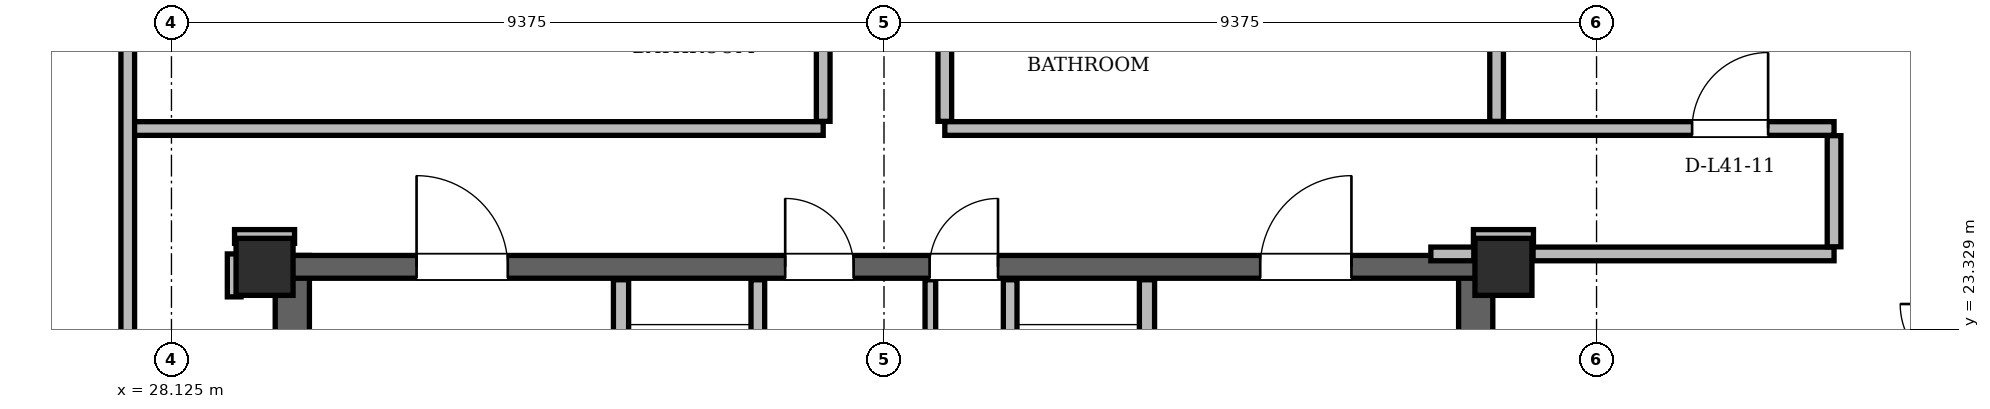
"""IFC4 building model, lengths in metres.
Left out: names, types, materials, properties, quantities, classifications, styles, units other than length and angle.
Written with IfcOpenShell. Run it as: python <this file> out.ifc"""

import sys

from ifc_helpers import new_model, si_unit, direction, frame, frame_2d, origin, origin_2d, place, context, subcontext, project, spatial, rectangle, hollow_rectangle, extrude, element, fill, save


model = new_model("IFC4")
c1 = context("Model", 3, precision=1e-05, world=origin(), true_north=direction((0.0, 1.0)))
c2 = subcontext(c1, "Body", "Model", "MODEL_VIEW")
j1 = project(units=[si_unit("LENGTHUNIT", "METRE"), si_unit("PLANEANGLEUNIT", "RADIAN")], contexts=[c1])
p1 = place(None, origin())
s1 = spatial("IfcSite", under=j1, at=p1, CompositionType="ELEMENT")
p2 = place(p1, origin())
s2 = spatial("IfcBuilding", under=s1, at=p2, CompositionType="ELEMENT")
p3 = place(p2, frame((0.0, 0.0, 156.6)))
s3 = spatial("IfcBuildingStorey", under=s2, at=p3, CompositionType="ELEMENT", Elevation=156.6)
for number, where, z_axis, x_axis in (
    (1, (45.65, 24.15, 0.0), (0.0, 0.0, 1.0), (1.0, 0.0, 0.0)),
    (2, (29.35, 24.15, 0.0), (0.0, 0.0, 1.0), (1.0, 0.0, 0.0)),
):
    element("IfcColumn", number, at=place(p3, frame(where, z_axis=z_axis, x_axis=x_axis)), inside=s3, PredefinedType="COLUMN", context=c2, shape_type="SweptSolid", body=[
        extrude(hollow_rectangle(XDim=0.75, YDim=0.75, WallThickness=0.06, at=origin_2d()), origin(), (0.0, 0.0, 1.0), 3.6),
    ])
for number, where, z_axis, x_axis in (
    (3, (29.715, 11.0, 0.0), (0.0, 0.0, 1.0), (0.0, 1.0, 0.0)),
    (4, (45.285, 11.0, 0.0), (0.0, 0.0, 1.0), (0.0, 1.0, 0.0)),
):
    element("IfcWall", number, at=place(p3, frame(where, z_axis=z_axis, x_axis=x_axis)), inside=s3, PredefinedType="SHEAR", context=c2, shape_type="SweptSolid", body=[
        extrude(rectangle(XDim=13.3, YDim=0.45, at=frame_2d((6.65, 0.0))), origin(), (0.0, 0.0, 1.0), 3.38),
    ])
p4 = place(p3, frame((29.65, 24.15, 0.0), z_axis=(0.0, 0.0, 1.0), x_axis=(1.0, 0.0, 0.0)))
e5 = element("IfcWall", 5, at=p4, inside=s3, PredefinedType="SHEAR", context=c2, shape_type="SweptSolid", body=[
    extrude(rectangle(XDim=15.7, YDim=0.3, at=frame_2d((7.85, 0.0))), origin(), (0.0, 0.0, 1.0), 3.38),
])
p5 = place(p4, frame((1.7, 0.0, 0.0)))
e6 = element("IfcOpeningElement", 6, at=p5, cuts=e5, PredefinedType="OPENING", context=c2, shape_type="SweptSolid", body=[
    extrude(rectangle(XDim=1.2, YDim=2.2, at=frame_2d((0.6, 1.1))), frame((0.0, 0.15, 0.0), z_axis=(0.0, -1.0, 0.0), x_axis=(1.0, 0.0, 0.0)), (0.0, 0.0, 1.0), 0.3),
])
p6 = place(p4, frame((12.8, 0.0, 0.0)))
e7 = element("IfcOpeningElement", 7, at=p6, cuts=e5, PredefinedType="OPENING", context=c2, shape_type="SweptSolid", body=[
    extrude(rectangle(XDim=1.2, YDim=2.2, at=frame_2d((0.6, 1.1))), frame((0.0, 0.15, 0.0), z_axis=(0.0, -1.0, 0.0), x_axis=(1.0, 0.0, 0.0)), (0.0, 0.0, 1.0), 0.3),
])
p7 = place(p4, frame((6.55, 0.0, 0.0)))
e8 = element("IfcOpeningElement", 8, at=p7, cuts=e5, PredefinedType="OPENING", context=c2, shape_type="SweptSolid", body=[
    extrude(rectangle(XDim=0.9, YDim=2.05, at=frame_2d((0.45, 1.025))), frame((0.0, 0.15, 0.0), z_axis=(0.0, -1.0, 0.0), x_axis=(1.0, 0.0, 0.0)), (0.0, 0.0, 1.0), 0.3),
])
p8 = place(p4, frame((8.45, 0.0, 0.0)))
e9 = element("IfcOpeningElement", 9, at=p8, cuts=e5, PredefinedType="OPENING", context=c2, shape_type="SweptSolid", body=[
    extrude(rectangle(XDim=0.9, YDim=2.05, at=frame_2d((0.45, 1.025))), frame((0.0, 0.15, 0.0), z_axis=(0.0, -1.0, 0.0), x_axis=(1.0, 0.0, 0.0)), (0.0, 0.0, 1.0), 0.3),
])
p9 = place(p3, frame((59.902, 12.477, 0.0), z_axis=(0.0, 0.0, 1.0), x_axis=(-0.499998839087, 0.866026074037, 0.0)))
e10 = element("IfcWall", 10, at=p9, inside=s3, PredefinedType="SOLIDWALL", context=c2, shape_type="SweptSolid", body=[
    extrude(rectangle(XDim=35.606, YDim=0.34, at=frame_2d((17.803, 0.0))), origin(), (0.0, 0.0, 1.0), 2.6),
])
p10 = place(p9, frame((7.615, 0.0, 0.0)))
e11 = element("IfcOpeningElement", 11, at=p10, cuts=e10, PredefinedType="OPENING", context=c2, shape_type="SweptSolid", body=[
    extrude(rectangle(XDim=1.5, YDim=2.2, at=frame_2d((0.75, 1.1))), frame((0.0, 0.17, 0.0), z_axis=(0.0, -1.0, 0.0), x_axis=(1.0, 0.0, 0.0)), (0.0, 0.0, 1.0), 0.34),
])
p11 = place(p9, frame((30.887, 0.0, 0.0)))
e12 = element("IfcOpeningElement", 12, at=p11, cuts=e10, PredefinedType="OPENING", context=c2, shape_type="SweptSolid", body=[
    extrude(rectangle(XDim=1.5, YDim=2.2, at=frame_2d((0.75, 1.1))), frame((0.0, 0.17, 0.0), z_axis=(0.0, -1.0, 0.0), x_axis=(1.0, 0.0, 0.0)), (0.0, 0.0, 1.0), 0.34),
])
p12 = place(p9, frame((0.903, 0.0, 0.85)))
e13 = element("IfcOpeningElement", 13, at=p12, cuts=e10, PredefinedType="OPENING", context=c2, shape_type="SweptSolid", body=[
    extrude(rectangle(XDim=1.2, YDim=1.48, at=frame_2d((0.6, 0.74))), frame((0.0, 0.17, 0.0), z_axis=(0.0, -1.0, 0.0), x_axis=(1.0, 0.0, 0.0)), (0.0, 0.0, 1.0), 0.34),
])
p13 = place(p9, frame((17.144, 0.0, 0.85)))
e14 = element("IfcOpeningElement", 14, at=p13, cuts=e10, PredefinedType="OPENING", context=c2, shape_type="SweptSolid", body=[
    extrude(rectangle(XDim=2.6, YDim=1.64, at=frame_2d((1.3, 0.82))), frame((0.0, 0.17, 0.0), z_axis=(0.0, -1.0, 0.0), x_axis=(1.0, 0.0, 0.0)), (0.0, 0.0, 1.0), 0.34),
])
p14 = place(p9, frame((22.144, 0.0, 0.85)))
e15 = element("IfcOpeningElement", 15, at=p14, cuts=e10, PredefinedType="OPENING", context=c2, shape_type="SweptSolid", body=[
    extrude(rectangle(XDim=2.0, YDim=1.64, at=frame_2d((1.0, 0.82))), frame((0.0, 0.17, 0.0), z_axis=(0.0, -1.0, 0.0), x_axis=(1.0, 0.0, 0.0)), (0.0, 0.0, 1.0), 0.34),
])
p15 = place(p9, frame((13.335, 0.0, 0.85)))
e16 = element("IfcOpeningElement", 16, at=p15, cuts=e10, PredefinedType="OPENING", context=c2, shape_type="SweptSolid", body=[
    extrude(rectangle(XDim=1.6, YDim=1.64, at=frame_2d((0.8, 0.82))), frame((0.0, 0.17, 0.0), z_axis=(0.0, -1.0, 0.0), x_axis=(1.0, 0.0, 0.0)), (0.0, 0.0, 1.0), 0.34),
])
p16 = place(p9, frame((25.813, 0.0, 0.85)))
e17 = element("IfcOpeningElement", 17, at=p16, cuts=e10, PredefinedType="OPENING", context=c2, shape_type="SweptSolid", body=[
    extrude(rectangle(XDim=1.6, YDim=1.64, at=frame_2d((0.8, 0.82))), frame((0.0, 0.17, 0.0), z_axis=(0.0, -1.0, 0.0), x_axis=(1.0, 0.0, 0.0)), (0.0, 0.0, 1.0), 0.34),
])
p17 = place(p9, frame((33.272, 0.0, 0.85)))
e18 = element("IfcOpeningElement", 18, at=p17, cuts=e10, PredefinedType="OPENING", context=c2, shape_type="SweptSolid", body=[
    extrude(rectangle(XDim=1.2, YDim=1.48, at=frame_2d((0.6, 0.74))), frame((0.0, 0.17, 0.0), z_axis=(0.0, -1.0, 0.0), x_axis=(1.0, 0.0, 0.0)), (0.0, 0.0, 1.0), 0.34),
])
p18 = place(p3, frame((32.901, 43.313, 0.0), z_axis=(0.0, 0.0, 1.0), x_axis=(-0.499998839087, -0.866026074037, 0.0)))
e19 = element("IfcWall", 19, at=p18, inside=s3, PredefinedType="SOLIDWALL", context=c2, shape_type="SweptSolid", body=[
    extrude(rectangle(XDim=35.606, YDim=0.34, at=frame_2d((17.803, 0.0))), origin(), (0.0, 0.0, 1.0), 2.6),
])
p19 = place(p18, frame((8.034, 0.0, 0.0)))
e20 = element("IfcOpeningElement", 20, at=p19, cuts=e19, PredefinedType="OPENING", context=c2, shape_type="SweptSolid", body=[
    extrude(rectangle(XDim=1.5, YDim=2.2, at=frame_2d((0.75, 1.1))), frame((0.0, 0.17, 0.0), z_axis=(0.0, -1.0, 0.0), x_axis=(1.0, 0.0, 0.0)), (0.0, 0.0, 1.0), 0.34),
])
p20 = place(p18, frame((30.887, 0.0, 0.0)))
e21 = element("IfcOpeningElement", 21, at=p20, cuts=e19, PredefinedType="OPENING", context=c2, shape_type="SweptSolid", body=[
    extrude(rectangle(XDim=1.5, YDim=2.2, at=frame_2d((0.75, 1.1))), frame((0.0, 0.17, 0.0), z_axis=(0.0, -1.0, 0.0), x_axis=(1.0, 0.0, 0.0)), (0.0, 0.0, 1.0), 0.34),
])
p21 = place(p18, frame((33.096, 0.0, 0.85)))
e22 = element("IfcOpeningElement", 22, at=p21, cuts=e19, PredefinedType="OPENING", context=c2, shape_type="SweptSolid", body=[
    extrude(rectangle(XDim=1.2, YDim=1.48, at=frame_2d((0.6, 0.74))), frame((0.0, 0.17, 0.0), z_axis=(0.0, -1.0, 0.0), x_axis=(1.0, 0.0, 0.0)), (0.0, 0.0, 1.0), 0.34),
])
p22 = place(p18, frame((13.168, 0.0, 0.85)))
e23 = element("IfcOpeningElement", 23, at=p22, cuts=e19, PredefinedType="OPENING", context=c2, shape_type="SweptSolid", body=[
    extrude(rectangle(XDim=1.2, YDim=1.48, at=frame_2d((0.6, 0.74))), frame((0.0, 0.17, 0.0), z_axis=(0.0, -1.0, 0.0), x_axis=(1.0, 0.0, 0.0)), (0.0, 0.0, 1.0), 0.34),
])
p23 = place(p18, frame((20.876, 0.0, 0.85)))
e24 = element("IfcOpeningElement", 24, at=p23, cuts=e19, PredefinedType="OPENING", context=c2, shape_type="SweptSolid", body=[
    extrude(rectangle(XDim=2.8, YDim=1.64, at=frame_2d((1.4, 0.82))), frame((0.0, 0.17, 0.0), z_axis=(0.0, -1.0, 0.0), x_axis=(1.0, 0.0, 0.0)), (0.0, 0.0, 1.0), 0.34),
])
p24 = place(p18, frame((2.906, 0.0, 0.85)))
e25 = element("IfcOpeningElement", 25, at=p24, cuts=e19, PredefinedType="OPENING", context=c2, shape_type="SweptSolid", body=[
    extrude(rectangle(XDim=1.6, YDim=1.64, at=frame_2d((0.8, 0.82))), frame((0.0, 0.17, 0.0), z_axis=(0.0, -1.0, 0.0), x_axis=(1.0, 0.0, 0.0)), (0.0, 0.0, 1.0), 0.34),
])
p25 = place(p3, frame((34.04, 19.48, 0.0), z_axis=(0.0, 0.0, 1.0), x_axis=(0.0, 1.0, 0.0)))
e26 = element("IfcWall", 26, at=p25, inside=s3, PredefinedType="PARTITIONING", context=c2, shape_type="SweptSolid", body=[
    extrude(rectangle(XDim=4.5, YDim=0.2, at=frame_2d((2.25, 0.0))), origin(), (0.0, 0.0, 1.0), 2.42),
])
p26 = place(p25, frame((2.12, 0.0, 0.0)))
e27 = element("IfcOpeningElement", 27, at=p26, cuts=e26, PredefinedType="OPENING", context=c2, shape_type="SweptSolid", body=[
    extrude(rectangle(XDim=1.1, YDim=2.2, at=frame_2d((0.55, 1.1))), frame((0.0, 0.1, 0.0), z_axis=(0.0, -1.0, 0.0), x_axis=(1.0, 0.0, 0.0)), (0.0, 0.0, 1.0), 0.2),
])
p27 = place(p3, frame((35.84, 20.96, 0.0), z_axis=(0.0, 0.0, 1.0), x_axis=(0.0, 1.0, 0.0)))
e28 = element("IfcWall", 28, at=p27, inside=s3, PredefinedType="PARTITIONING", context=c2, shape_type="SweptSolid", body=[
    extrude(rectangle(XDim=3.02, YDim=0.18, at=frame_2d((1.51, 0.0))), origin(), (0.0, 0.0, 1.0), 2.42),
])
p28 = place(p3, frame((40.96, 19.48, 0.0), z_axis=(0.0, 0.0, 1.0), x_axis=(0.0, 1.0, 0.0)))
e29 = element("IfcWall", 29, at=p28, inside=s3, PredefinedType="PARTITIONING", context=c2, shape_type="SweptSolid", body=[
    extrude(rectangle(XDim=4.5, YDim=0.2, at=frame_2d((2.25, 0.0))), origin(), (0.0, 0.0, 1.0), 2.42),
])
p29 = place(p28, frame((2.12, 0.0, 0.0)))
e30 = element("IfcOpeningElement", 30, at=p29, cuts=e29, PredefinedType="OPENING", context=c2, shape_type="SweptSolid", body=[
    extrude(rectangle(XDim=1.1, YDim=2.2, at=frame_2d((0.55, 1.1))), frame((0.0, 0.1, 0.0), z_axis=(0.0, -1.0, 0.0), x_axis=(1.0, 0.0, 0.0)), (0.0, 0.0, 1.0), 0.2),
])
p30 = place(p3, frame((39.16, 20.96, 0.0), z_axis=(0.0, 0.0, 1.0), x_axis=(0.0, 1.0, 0.0)))
e31 = element("IfcWall", 31, at=p30, inside=s3, PredefinedType="PARTITIONING", context=c2, shape_type="SweptSolid", body=[
    extrude(rectangle(XDim=3.02, YDim=0.18, at=frame_2d((1.51, 0.0))), origin(), (0.0, 0.0, 1.0), 2.42),
])
p31 = place(p3, frame((38.11, 21.06, 0.0), z_axis=(0.0, 0.0, 1.0), x_axis=(0.0, 1.0, 0.0)))
e32 = element("IfcWall", 32, at=p31, inside=s3, PredefinedType="PARTITIONING", context=c2, shape_type="SweptSolid", body=[
    extrude(rectangle(XDim=2.92, YDim=0.14, at=frame_2d((1.46, 0.0))), origin(), (0.0, 0.0, 1.0), 2.42),
])
p32 = place(p3, frame((44.695, 24.32, 0.0), z_axis=(0.0, 0.0, 1.0), x_axis=(1.0, 0.0, 0.0)))
e33 = element("IfcWall", 33, at=p32, inside=s3, PredefinedType="PARTITIONING", context=c2, shape_type="SweptSolid", body=[
    extrude(rectangle(XDim=0.565, YDim=0.18, at=frame_2d((0.282, 0.0))), origin(), (0.0, 0.0, 1.0), 2.42),
])
p33 = place(p3, frame((46.04, 24.32, 0.0), z_axis=(0.0, 0.0, 1.0), x_axis=(1.0, 0.0, 0.0)))
e34 = element("IfcWall", 34, at=p33, inside=s3, PredefinedType="PARTITIONING", context=c2, shape_type="SweptSolid", body=[
    extrude(rectangle(XDim=3.96, YDim=0.18, at=frame_2d((1.98, 0.0))), origin(), (0.0, 0.0, 1.0), 3.38),
])
for number, where, z_axis, x_axis in (
    (35, (28.955, 24.55, 0.0), (0.0, 0.0, 1.0), (1.0, 0.0, 0.0)),
    (36, (45.255, 24.55, 0.0), (0.0, 0.0, 1.0), (1.0, 0.0, 0.0)),
):
    element("IfcWall", number, at=place(p3, frame(where, z_axis=z_axis, x_axis=x_axis)), inside=s3, PredefinedType="PARTITIONING", context=c2, shape_type="SweptSolid", body=[
        extrude(rectangle(XDim=0.79, YDim=0.18, at=frame_2d((0.395, 0.0))), origin(), (0.0, 0.0, 1.0), 2.842),
    ])
p34 = place(p3, frame((27.55, 25.97, 0.0), z_axis=(0.0, 0.0, 1.0), x_axis=(1.0, 0.0, 0.0)))
e37 = element("IfcWall", 37, at=p34, inside=s3, PredefinedType="PARTITIONING", context=c2, shape_type="SweptSolid", body=[
    extrude(rectangle(XDim=9.15, YDim=0.18, at=frame_2d((4.575, 0.0))), origin(), (0.0, 0.0, 1.0), 2.842),
])
p35 = place(p3, frame((38.3, 25.97, 0.0), z_axis=(0.0, 0.0, 1.0), x_axis=(1.0, 0.0, 0.0)))
e38 = element("IfcWall", 38, at=p35, inside=s3, PredefinedType="PARTITIONING", context=c2, shape_type="SweptSolid", body=[
    extrude(rectangle(XDim=11.7, YDim=0.18, at=frame_2d((5.85, 0.0))), origin(), (0.0, 0.0, 1.0), 2.842),
])
p36 = place(p35, frame((9.832, 0.0, 0.0)))
e39 = element("IfcOpeningElement", 39, at=p36, cuts=e38, PredefinedType="OPENING", context=c2, shape_type="SweptSolid", body=[
    extrude(rectangle(XDim=1.0, YDim=2.18, at=frame_2d((0.5, 1.09))), frame((0.0, 0.09, 0.0), z_axis=(0.0, -1.0, 0.0), x_axis=(1.0, 0.0, 0.0)), (0.0, 0.0, 1.0), 0.18),
])
p37 = place(p3, frame((27.55, 18.544, 0.0), z_axis=(0.0, 0.0, 1.0), x_axis=(0.0, 1.0, 0.0)))
e40 = element("IfcWall", 40, at=p37, inside=s3, PredefinedType="PARTITIONING", context=c2, shape_type="SweptSolid", body=[
    extrude(rectangle(XDim=15.153, YDim=0.18, at=frame_2d((7.576, 0.0))), origin(), (0.0, 0.0, 1.0), 3.38),
])
p38 = place(p37, frame((3.68, 0.0, 0.0)))
e41 = element("IfcOpeningElement", 41, at=p38, cuts=e40, PredefinedType="OPENING", context=c2, shape_type="SweptSolid", body=[
    extrude(rectangle(XDim=1.0, YDim=2.18, at=frame_2d((0.5, 1.09))), frame((0.0, 0.09, 0.0), z_axis=(0.0, -1.0, 0.0), x_axis=(1.0, 0.0, 0.0)), (0.0, 0.0, 1.0), 0.18),
])
p39 = place(p3, frame((28.95, 23.755, 0.0), z_axis=(0.0, 0.0, 1.0), x_axis=(0.0, 1.0, 0.0)))
e42 = element("IfcWall", 42, at=p39, inside=s3, PredefinedType="PARTITIONING", context=c2, shape_type="SweptSolid", body=[
    extrude(rectangle(XDim=0.565, YDim=0.18, at=frame_2d((0.283, 0.0))), origin(), (0.0, 0.0, 1.0), 3.38),
])
p40 = place(p3, frame((36.7, 26.064, 0.0), z_axis=(0.0, 0.0, 1.0), x_axis=(0.0, 1.0, 0.0)))
e43 = element("IfcWall", 43, at=p40, inside=s3, PredefinedType="PARTITIONING", context=c2, shape_type="SweptSolid", body=[
    extrude(rectangle(XDim=17.075, YDim=0.18, at=frame_2d((8.537, 0.0))), origin(), (0.0, 0.0, 1.0), 3.38),
])
p41 = place(p40, frame((7.148, 0.0, 0.0)))
e44 = element("IfcOpeningElement", 44, at=p41, cuts=e43, PredefinedType="OPENING", context=c2, shape_type="SweptSolid", body=[
    extrude(rectangle(XDim=1.0, YDim=2.18, at=frame_2d((0.5, 1.09))), frame((0.0, 0.09, 0.0), z_axis=(0.0, -1.0, 0.0), x_axis=(1.0, 0.0, 0.0)), (0.0, 0.0, 1.0), 0.18),
])
p42 = place(p3, frame((38.3, 26.064, 0.0), z_axis=(0.0, 0.0, 1.0), x_axis=(0.0, 1.0, 0.0)))
e45 = element("IfcWall", 45, at=p42, inside=s3, PredefinedType="PARTITIONING", context=c2, shape_type="SweptSolid", body=[
    extrude(rectangle(XDim=13.442, YDim=0.18, at=frame_2d((6.721, 0.0))), origin(), (0.0, 0.0, 1.0), 3.38),
])
p43 = place(p42, frame((7.148, 0.0, 0.0)))
e46 = element("IfcOpeningElement", 46, at=p43, cuts=e45, PredefinedType="OPENING", context=c2, shape_type="SweptSolid", body=[
    extrude(rectangle(XDim=1.0, YDim=2.18, at=frame_2d((0.5, 1.09))), frame((0.0, 0.09, 0.0), z_axis=(0.0, -1.0, 0.0), x_axis=(1.0, 0.0, 0.0)), (0.0, 0.0, 1.0), 0.18),
])
p44 = place(p3, frame((45.56, 26.064, 0.0), z_axis=(0.0, 0.0, 1.0), x_axis=(0.0, 1.0, 0.0)))
e47 = element("IfcWall", 47, at=p44, inside=s3, PredefinedType="PARTITIONING", context=c2, shape_type="SweptSolid", body=[
    extrude(rectangle(XDim=10.906, YDim=0.18, at=frame_2d((5.453, 0.0))), origin(), (0.0, 0.0, 1.0), 3.38),
])
p45 = place(p3, frame((50.0, 24.414, 0.0), z_axis=(0.0, 0.0, 1.0), x_axis=(0.0, 1.0, 0.0)))
e48 = element("IfcWall", 48, at=p45, inside=s3, PredefinedType="PARTITIONING", context=c2, shape_type="SweptSolid", body=[
    extrude(rectangle(XDim=1.462, YDim=0.18, at=frame_2d((0.731, 0.0))), origin(), (0.0, 0.0, 1.0), 3.38),
])
p46 = place(p5, origin())
e49 = element("IfcDoor", 49, at=p46, inside=s3, OperationType="SINGLE_SWING_LEFT", PredefinedType="DOOR", context=c2, shape_type="SweptSolid", body=[
    extrude(rectangle(XDim=1.2, YDim=2.2, at=frame_2d((0.6, 1.1))), frame((0.0, 0.025, 0.0), z_axis=(0.0, -1.0, 0.0), x_axis=(1.0, 0.0, 0.0)), (0.0, 0.0, 1.0), 0.05),
])
fill(e6, e49)
p47 = place(p6, origin())
e50 = element("IfcDoor", 50, at=p47, inside=s3, OperationType="SINGLE_SWING_RIGHT", PredefinedType="DOOR", context=c2, shape_type="SweptSolid", body=[
    extrude(rectangle(XDim=1.2, YDim=2.2, at=frame_2d((0.6, 1.1))), frame((0.0, 0.025, 0.0), z_axis=(0.0, -1.0, 0.0), x_axis=(1.0, 0.0, 0.0)), (0.0, 0.0, 1.0), 0.05),
])
fill(e7, e50)
p48 = place(p7, origin())
e51 = element("IfcDoor", 51, at=p48, inside=s3, OperationType="SINGLE_SWING_LEFT", PredefinedType="DOOR", context=c2, shape_type="SweptSolid", body=[
    extrude(rectangle(XDim=0.9, YDim=2.05, at=frame_2d((0.45, 1.025))), frame((0.0, 0.025, 0.0), z_axis=(0.0, -1.0, 0.0), x_axis=(1.0, 0.0, 0.0)), (0.0, 0.0, 1.0), 0.05),
])
fill(e8, e51)
p49 = place(p8, origin())
e52 = element("IfcDoor", 52, at=p49, inside=s3, OperationType="SINGLE_SWING_RIGHT", PredefinedType="DOOR", context=c2, shape_type="SweptSolid", body=[
    extrude(rectangle(XDim=0.9, YDim=2.05, at=frame_2d((0.45, 1.025))), frame((0.0, 0.025, 0.0), z_axis=(0.0, -1.0, 0.0), x_axis=(1.0, 0.0, 0.0)), (0.0, 0.0, 1.0), 0.05),
])
fill(e9, e52)
p50 = place(p36, origin())
e53 = element("IfcDoor", 53, at=p50, inside=s3, OperationType="SINGLE_SWING_RIGHT", PredefinedType="DOOR", context=c2, shape_type="SweptSolid", body=[
    extrude(rectangle(XDim=1.0, YDim=2.18, at=frame_2d((0.5, 1.09))), frame((0.0, 0.025, 0.0), z_axis=(0.0, -1.0, 0.0), x_axis=(1.0, 0.0, 0.0)), (0.0, 0.0, 1.0), 0.05),
])
fill(e39, e53)
save(model, sys.argv[1])
